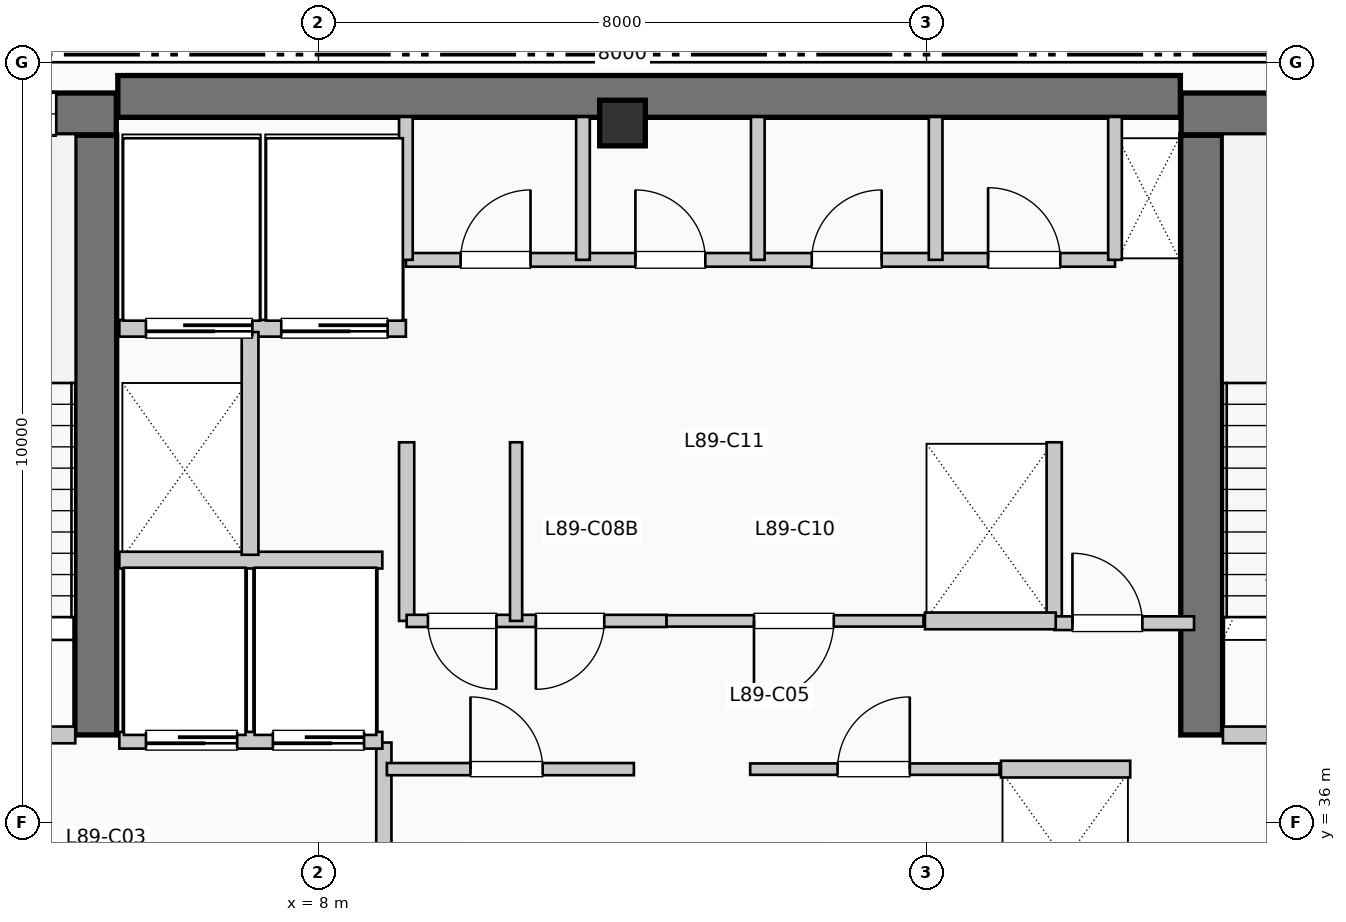
"""IFC4 building model, lengths in metres.
Left out: names, types, materials, properties, quantities, classifications, styles, units other than length and angle.
Written with IfcOpenShell. Run it as: python <this file> out.ifc"""

import sys

from ifc_helpers import new_model, si_unit, direction, frame, frame_2d, origin, origin_2d, place, context, subcontext, project, spatial, rectangle, extrude, element, fill, save


model = new_model("IFC4")
c1 = context("Model", 3, precision=1e-05, world=origin(), true_north=direction((0.0, 1.0)))
c2 = subcontext(c1, "Body", "Model", "MODEL_VIEW")
j1 = project(units=[si_unit("LENGTHUNIT", "METRE"), si_unit("PLANEANGLEUNIT", "RADIAN")], contexts=[c1])
p1 = place(None, origin())
s1 = spatial("IfcSite", under=j1, at=p1, CompositionType="ELEMENT")
p2 = place(p1, origin())
s2 = spatial("IfcBuilding", under=s1, at=p2, CompositionType="ELEMENT")
p3 = place(p2, frame((0.0, 0.0, 365.97)))
s3 = spatial("IfcBuildingStorey", under=s2, at=p3, CompositionType="ELEMENT", Elevation=365.97)
p4 = place(p3, frame((5.36, 45.55, 0.0), z_axis=(0.0, 0.0, 1.0), x_axis=(1.0, 0.0, 0.0)))
e1 = element("IfcWall", 1, at=p4, inside=s3, PredefinedType="SHEAR", context=c2, shape_type="SweptSolid", body=[
    extrude(rectangle(XDim=13.98, YDim=0.55, at=frame_2d((6.99, 0.0))), origin(), (0.0, 0.0, 1.0), 3.96),
])
p5 = place(p3, frame((5.07, 37.15, 0.0), z_axis=(0.0, 0.0, 1.0), x_axis=(0.0, 1.0, 0.0)))
e2 = element("IfcWall", 2, at=p5, inside=s3, PredefinedType="SHEAR", context=c2, shape_type="SweptSolid", body=[
    extrude(rectangle(XDim=7.89, YDim=0.55, at=frame_2d((3.945, 0.0))), origin(), (0.0, 0.0, 1.0), 3.96),
])
p6 = place(p3, frame((1.1, 45.32, 0.0), z_axis=(0.0, 0.0, 1.0), x_axis=(1.0, 0.0, 0.0)))
e3 = element("IfcWall", 3, at=p6, inside=s3, PredefinedType="SHEAR", context=c2, shape_type="SweptSolid", body=[
    extrude(rectangle(XDim=4.24, YDim=0.55, at=frame_2d((2.12, 0.0))), origin(), (0.0, 0.0, 1.0), 3.96),
])
p7 = place(p6, frame((2.05, 0.0, 1.05)))
e4 = element("IfcOpeningElement", 4, at=p7, cuts=e3, PredefinedType="OPENING", context=c2, shape_type="SweptSolid", body=[
    extrude(rectangle(XDim=1.4, YDim=1.8, at=frame_2d((0.7, 0.9))), frame((0.0, 0.285, 0.0), z_axis=(0.0, -1.0, 0.0), x_axis=(1.0, 0.0, 0.0)), (0.0, 0.0, 1.0), 0.57),
])
p8 = place(p3, frame((19.62, 37.15, 0.0), z_axis=(0.0, 0.0, 1.0), x_axis=(0.0, 1.0, 0.0)))
e5 = element("IfcWall", 5, at=p8, inside=s3, PredefinedType="SHEAR", context=c2, shape_type="SweptSolid", body=[
    extrude(rectangle(XDim=7.89, YDim=0.55, at=frame_2d((3.945, 0.0))), origin(), (0.0, 0.0, 1.0), 3.96),
])
p9 = place(p3, frame((19.35, 45.32, 0.0), z_axis=(0.0, 0.0, 1.0), x_axis=(1.0, 0.0, 0.0)))
e6 = element("IfcWall", 6, at=p9, inside=s3, PredefinedType="SHEAR", context=c2, shape_type="SweptSolid", body=[
    extrude(rectangle(XDim=3.69, YDim=0.55, at=frame_2d((1.845, 0.0))), origin(), (0.0, 0.0, 1.0), 3.96),
])
p10 = place(p9, frame((1.15, 0.0, 1.05)))
e7 = element("IfcOpeningElement", 7, at=p10, cuts=e6, PredefinedType="OPENING", context=c2, shape_type="SweptSolid", body=[
    extrude(rectangle(XDim=1.4, YDim=1.8, at=frame_2d((0.7, 0.9))), frame((0.0, 0.285, 0.0), z_axis=(0.0, -1.0, 0.0), x_axis=(1.0, 0.0, 0.0)), (0.0, 0.0, 1.0), 0.57),
])
p11 = place(p3, frame((12.0, 45.2, 0.0), z_axis=(0.0, 0.0, 1.0), x_axis=(1.0, 0.0, 0.0)))
e8 = element("IfcColumn", 8, at=p11, inside=s3, PredefinedType="COLUMN", context=c2, shape_type="SweptSolid", body=[
    extrude(rectangle(XDim=0.6, YDim=0.6, at=origin_2d()), origin(), (0.0, 0.0, 1.0), 3.96),
])
p12 = place(p3, frame((1.65, 37.15, 0.0), z_axis=(0.0, 0.0, 1.0), x_axis=(1.0, 0.0, 0.0)))
e9 = element("IfcWall", 9, at=p12, inside=s3, PredefinedType="PARTITIONING", context=c2, shape_type="SweptSolid", body=[
    extrude(rectangle(XDim=3.15, YDim=0.22, at=frame_2d((1.575, 0.0))), origin(), (0.0, 0.0, 1.0), 3.61),
])
p13 = place(p12, frame((2.05, 0.0, 0.0), z_axis=(0.0, 0.0, 1.0), x_axis=(-1.0, 0.0, 0.0)))
e10 = element("IfcOpeningElement", 10, at=p13, cuts=e9, PredefinedType="OPENING", context=c2, shape_type="SweptSolid", body=[
    extrude(rectangle(XDim=1.05, YDim=2.15, at=frame_2d((0.525, 1.075))), frame((0.0, 0.12, 0.0), z_axis=(0.0, -1.0, 0.0), x_axis=(1.0, 0.0, 0.0)), (0.0, 0.0, 1.0), 0.24),
])
p14 = place(p3, frame((8.86, 34.55, 0.0), z_axis=(0.0, 0.0, 1.0), x_axis=(0.0, 1.0, 0.0)))
e11 = element("IfcWall", 11, at=p14, inside=s3, PredefinedType="PARTITIONING", context=c2, shape_type="SweptSolid", body=[
    extrude(rectangle(XDim=2.5, YDim=0.2, at=frame_2d((1.25, 0.0))), origin(), (0.0, 0.0, 1.0), 3.61),
])
p15 = place(p3, frame((19.9, 37.15, 0.0), z_axis=(0.0, 0.0, 1.0), x_axis=(1.0, 0.0, 0.0)))
e12 = element("IfcWall", 12, at=p15, inside=s3, PredefinedType="PARTITIONING", context=c2, shape_type="SweptSolid", body=[
    extrude(rectangle(XDim=3.15, YDim=0.22, at=frame_2d((1.575, 0.0))), origin(), (0.0, 0.0, 1.0), 3.61),
])
p16 = place(p15, frame((2.05, 0.0, 0.0), z_axis=(0.0, 0.0, 1.0), x_axis=(-1.0, 0.0, 0.0)))
e13 = element("IfcOpeningElement", 13, at=p16, cuts=e12, PredefinedType="OPENING", context=c2, shape_type="SweptSolid", body=[
    extrude(rectangle(XDim=1.05, YDim=2.15, at=frame_2d((0.525, 1.075))), frame((0.0, 0.12, 0.0), z_axis=(0.0, -1.0, 0.0), x_axis=(1.0, 0.0, 0.0)), (0.0, 0.0, 1.0), 0.24),
])
p17 = place(p3, frame((5.38, 37.08, 0.0), z_axis=(0.0, 0.0, 1.0), x_axis=(1.0, 0.0, 0.0)))
e14 = element("IfcWall", 14, at=p17, inside=s3, PredefinedType="PARTITIONING", context=c2, shape_type="SweptSolid", body=[
    extrude(rectangle(XDim=3.46, YDim=0.22, at=frame_2d((1.73, 0.0))), origin(), (0.0, 0.0, 1.0), 3.61),
])
p18 = place(p17, frame((1.55, 0.0, 0.0), z_axis=(0.0, 0.0, 1.0), x_axis=(-1.0, 0.0, 0.0)))
e15 = element("IfcOpeningElement", 15, at=p18, cuts=e14, PredefinedType="OPENING", context=c2, shape_type="SweptSolid", body=[
    extrude(rectangle(XDim=1.2, YDim=2.2, at=frame_2d((0.6, 1.1))), frame((0.0, 0.12, 0.0), z_axis=(0.0, -1.0, 0.0), x_axis=(1.0, 0.0, 0.0)), (0.0, 0.0, 1.0), 0.24),
])
p19 = place(p17, frame((3.22, 0.0, 0.0), z_axis=(0.0, 0.0, 1.0), x_axis=(-1.0, 0.0, 0.0)))
e16 = element("IfcOpeningElement", 16, at=p19, cuts=e14, PredefinedType="OPENING", context=c2, shape_type="SweptSolid", body=[
    extrude(rectangle(XDim=1.2, YDim=2.2, at=frame_2d((0.6, 1.1))), frame((0.0, 0.12, 0.0), z_axis=(0.0, -1.0, 0.0), x_axis=(1.0, 0.0, 0.0)), (0.0, 0.0, 1.0), 0.24),
])
p20 = place(p3, frame((5.38, 39.45, 0.0), z_axis=(0.0, 0.0, 1.0), x_axis=(1.0, 0.0, 0.0)))
e17 = element("IfcWall", 17, at=p20, inside=s3, PredefinedType="PARTITIONING", context=c2, shape_type="SweptSolid", body=[
    extrude(rectangle(XDim=3.46, YDim=0.22, at=frame_2d((1.73, 0.0))), origin(), (0.0, 0.0, 1.0), 3.61),
])
p21 = place(p3, frame((5.38, 42.5, 0.0), z_axis=(0.0, 0.0, 1.0), x_axis=(1.0, 0.0, 0.0)))
e18 = element("IfcWall", 18, at=p21, inside=s3, PredefinedType="PARTITIONING", context=c2, shape_type="SweptSolid", body=[
    extrude(rectangle(XDim=3.77, YDim=0.22, at=frame_2d((1.885, 0.0))), origin(), (0.0, 0.0, 1.0), 3.61),
])
p22 = place(p21, frame((1.75, 0.0, 0.0), z_axis=(0.0, 0.0, 1.0), x_axis=(-1.0, 0.0, 0.0)))
e19 = element("IfcOpeningElement", 19, at=p22, cuts=e18, PredefinedType="OPENING", context=c2, shape_type="SweptSolid", body=[
    extrude(rectangle(XDim=1.4, YDim=2.2, at=frame_2d((0.7, 1.1))), frame((0.0, 0.12, 0.0), z_axis=(0.0, -1.0, 0.0), x_axis=(1.0, 0.0, 0.0)), (0.0, 0.0, 1.0), 0.24),
])
p23 = place(p21, frame((3.53, 0.0, 0.0), z_axis=(0.0, 0.0, 1.0), x_axis=(-1.0, 0.0, 0.0)))
e20 = element("IfcOpeningElement", 20, at=p23, cuts=e18, PredefinedType="OPENING", context=c2, shape_type="SweptSolid", body=[
    extrude(rectangle(XDim=1.4, YDim=2.2, at=frame_2d((0.7, 1.1))), frame((0.0, 0.12, 0.0), z_axis=(0.0, -1.0, 0.0), x_axis=(1.0, 0.0, 0.0)), (0.0, 0.0, 1.0), 0.24),
])
p24 = place(p3, frame((7.1, 39.52, 0.0), z_axis=(0.0, 0.0, 1.0), x_axis=(0.0, 1.0, 0.0)))
e21 = element("IfcWall", 21, at=p24, inside=s3, PredefinedType="PARTITIONING", context=c2, shape_type="SweptSolid", body=[
    extrude(rectangle(XDim=2.93, YDim=0.22, at=frame_2d((1.465, 0.0))), origin(), (0.0, 0.0, 1.0), 3.61),
])
for number, where, z_axis, x_axis in (
    (22, (9.16, 38.65, 0.0), (0.0, 0.0, 1.0), (0.0, 1.0, 0.0)),
    (23, (17.68, 38.65, 0.0), (0.0, 0.0, 1.0), (0.0, 1.0, 0.0)),
):
    element("IfcWall", number, at=place(p3, frame(where, z_axis=z_axis, x_axis=x_axis)), inside=s3, PredefinedType="PARTITIONING", context=c2, shape_type="SweptSolid", body=[
        extrude(rectangle(XDim=2.35, YDim=0.2, at=frame_2d((1.175, 0.0))), origin(), (0.0, 0.0, 1.0), 3.61),
    ])
p25 = place(p3, frame((17.68, 38.62, 0.0), z_axis=(0.0, 0.0, 1.0), x_axis=(1.0, 0.0, 0.0)))
e24 = element("IfcWall", 24, at=p25, inside=s3, PredefinedType="PARTITIONING", context=c2, shape_type="SweptSolid", body=[
    extrude(rectangle(XDim=1.84, YDim=0.18, at=frame_2d((0.92, 0.0))), origin(), (0.0, 0.0, 1.0), 3.61),
])
p26 = place(p25, frame((0.24, 0.0, 0.0)))
e25 = element("IfcOpeningElement", 25, at=p26, cuts=e24, PredefinedType="OPENING", context=c2, shape_type="SweptSolid", body=[
    extrude(rectangle(XDim=0.92, YDim=2.1, at=frame_2d((0.46, 1.05))), frame((0.0, 0.1, 0.0), z_axis=(0.0, -1.0, 0.0), x_axis=(1.0, 0.0, 0.0)), (0.0, 0.0, 1.0), 0.2),
])
p27 = place(p3, frame((8.9, 36.7, 0.0), z_axis=(0.0, 0.0, 1.0), x_axis=(1.0, 0.0, 0.0)))
e26 = element("IfcWall", 26, at=p27, inside=s3, PredefinedType="PARTITIONING", context=c2, shape_type="SweptSolid", body=[
    extrude(rectangle(XDim=3.25, YDim=0.16, at=frame_2d((1.625, 0.0))), origin(), (0.0, 0.0, 1.0), 3.61),
])
p28 = place(p27, frame((1.1, 0.0, 0.0)))
e27 = element("IfcOpeningElement", 27, at=p28, cuts=e26, PredefinedType="OPENING", context=c2, shape_type="SweptSolid", body=[
    extrude(rectangle(XDim=0.95, YDim=2.15, at=frame_2d((0.475, 1.075))), frame((0.0, 0.09, 0.0), z_axis=(0.0, -1.0, 0.0), x_axis=(1.0, 0.0, 0.0)), (0.0, 0.0, 1.0), 0.18),
])
p29 = place(p3, frame((9.16, 38.65, 0.0), z_axis=(0.0, 0.0, 1.0), x_axis=(1.0, 0.0, 0.0)))
e28 = element("IfcWall", 28, at=p29, inside=s3, PredefinedType="PARTITIONING", context=c2, shape_type="SweptSolid", body=[
    extrude(rectangle(XDim=3.42, YDim=0.16, at=frame_2d((1.71, 0.0))), origin(), (0.0, 0.0, 1.0), 3.61),
])
p30 = place(p29, frame((1.18, 0.0, 0.0), z_axis=(0.0, 0.0, 1.0), x_axis=(-1.0, 0.0, 0.0)))
e29 = element("IfcOpeningElement", 29, at=p30, cuts=e28, PredefinedType="OPENING", context=c2, shape_type="SweptSolid", body=[
    extrude(rectangle(XDim=0.9, YDim=2.15, at=frame_2d((0.45, 1.075))), frame((0.0, 0.09, 0.0), z_axis=(0.0, -1.0, 0.0), x_axis=(1.0, 0.0, 0.0)), (0.0, 0.0, 1.0), 0.18),
])
p31 = place(p29, frame((2.6, 0.0, 0.0), z_axis=(0.0, 0.0, 1.0), x_axis=(-1.0, 0.0, 0.0)))
e30 = element("IfcOpeningElement", 30, at=p31, cuts=e28, PredefinedType="OPENING", context=c2, shape_type="SweptSolid", body=[
    extrude(rectangle(XDim=0.9, YDim=2.15, at=frame_2d((0.45, 1.075))), frame((0.0, 0.09, 0.0), z_axis=(0.0, -1.0, 0.0), x_axis=(1.0, 0.0, 0.0)), (0.0, 0.0, 1.0), 0.18),
])
p32 = place(p3, frame((10.6, 38.65, 0.0), z_axis=(0.0, 0.0, 1.0), x_axis=(0.0, 1.0, 0.0)))
e31 = element("IfcWall", 31, at=p32, inside=s3, PredefinedType="PARTITIONING", context=c2, shape_type="SweptSolid", body=[
    extrude(rectangle(XDim=2.35, YDim=0.16, at=frame_2d((1.175, 0.0))), origin(), (0.0, 0.0, 1.0), 3.61),
])
p33 = place(p3, frame((13.68, 36.7, 0.0), z_axis=(0.0, 0.0, 1.0), x_axis=(1.0, 0.0, 0.0)))
e32 = element("IfcWall", 32, at=p33, inside=s3, PredefinedType="PARTITIONING", context=c2, shape_type="SweptSolid", body=[
    extrude(rectangle(XDim=3.28, YDim=0.15, at=frame_2d((1.64, 0.0))), origin(), (0.0, 0.0, 1.0), 3.61),
])
p34 = place(p33, frame((1.15, 0.0, 0.0)))
e33 = element("IfcOpeningElement", 33, at=p34, cuts=e32, PredefinedType="OPENING", context=c2, shape_type="SweptSolid", body=[
    extrude(rectangle(XDim=0.95, YDim=2.15, at=frame_2d((0.475, 1.075))), frame((0.0, 0.085, 0.0), z_axis=(0.0, -1.0, 0.0), x_axis=(1.0, 0.0, 0.0)), (0.0, 0.0, 1.0), 0.17),
])
p35 = place(p3, frame((12.58, 38.65, 0.0), z_axis=(0.0, 0.0, 1.0), x_axis=(1.0, 0.0, 0.0)))
e34 = element("IfcWall", 34, at=p35, inside=s3, PredefinedType="PARTITIONING", context=c2, shape_type="SweptSolid", body=[
    extrude(rectangle(XDim=3.38, YDim=0.15, at=frame_2d((1.69, 0.0))), origin(), (0.0, 0.0, 1.0), 3.61),
])
p36 = place(p35, frame((2.2, 0.0, 0.0), z_axis=(0.0, 0.0, 1.0), x_axis=(-1.0, 0.0, 0.0)))
e35 = element("IfcOpeningElement", 35, at=p36, cuts=e34, PredefinedType="OPENING", context=c2, shape_type="SweptSolid", body=[
    extrude(rectangle(XDim=1.05, YDim=2.15, at=frame_2d((0.525, 1.075))), frame((0.0, 0.085, 0.0), z_axis=(0.0, -1.0, 0.0), x_axis=(1.0, 0.0, 0.0)), (0.0, 0.0, 1.0), 0.17),
])
p37 = place(p3, frame((16.98, 36.7, 0.0), z_axis=(0.0, 0.0, 1.0), x_axis=(1.0, 0.0, 0.0)))
e36 = element("IfcWall", 36, at=p37, inside=s3, PredefinedType="PARTITIONING", context=c2, shape_type="SweptSolid", body=[
    extrude(rectangle(XDim=1.7, YDim=0.22, at=frame_2d((0.85, 0.0))), origin(), (0.0, 0.0, 1.0), 3.61),
])
p38 = place(p3, frame((15.98, 38.65, 0.0), z_axis=(0.0, 0.0, 1.0), x_axis=(1.0, 0.0, 0.0)))
e37 = element("IfcWall", 37, at=p38, inside=s3, PredefinedType="PARTITIONING", context=c2, shape_type="SweptSolid", body=[
    extrude(rectangle(XDim=1.72, YDim=0.22, at=frame_2d((0.86, 0.0))), origin(), (0.0, 0.0, 1.0), 3.61),
])
p39 = place(p3, frame((9.15, 43.4, 0.0), z_axis=(0.0, 0.0, 1.0), x_axis=(1.0, 0.0, 0.0)))
e38 = element("IfcWall", 38, at=p39, inside=s3, PredefinedType="PLUMBINGWALL", context=c2, shape_type="SweptSolid", body=[
    extrude(rectangle(XDim=9.33, YDim=0.18, at=frame_2d((4.665, 0.0))), origin(), (0.0, 0.0, 1.0), 3.61),
])
p40 = place(p39, frame((0.72, 0.0, 0.0)))
e39 = element("IfcOpeningElement", 39, at=p40, cuts=e38, PredefinedType="OPENING", context=c2, shape_type="SweptSolid", body=[
    extrude(rectangle(XDim=0.92, YDim=2.1, at=frame_2d((0.46, 1.05))), frame((0.0, 0.1, 0.0), z_axis=(0.0, -1.0, 0.0), x_axis=(1.0, 0.0, 0.0)), (0.0, 0.0, 1.0), 0.2),
])
p41 = place(p39, frame((3.02, 0.0, 0.0)))
e40 = element("IfcOpeningElement", 40, at=p41, cuts=e38, PredefinedType="OPENING", context=c2, shape_type="SweptSolid", body=[
    extrude(rectangle(XDim=0.92, YDim=2.1, at=frame_2d((0.46, 1.05))), frame((0.0, 0.1, 0.0), z_axis=(0.0, -1.0, 0.0), x_axis=(1.0, 0.0, 0.0)), (0.0, 0.0, 1.0), 0.2),
])
p42 = place(p39, frame((5.34, 0.0, 0.0)))
e41 = element("IfcOpeningElement", 41, at=p42, cuts=e38, PredefinedType="OPENING", context=c2, shape_type="SweptSolid", body=[
    extrude(rectangle(XDim=0.92, YDim=2.1, at=frame_2d((0.46, 1.05))), frame((0.0, 0.1, 0.0), z_axis=(0.0, -1.0, 0.0), x_axis=(1.0, 0.0, 0.0)), (0.0, 0.0, 1.0), 0.2),
])
p43 = place(p39, frame((7.66, 0.0, 0.0)))
e42 = element("IfcOpeningElement", 42, at=p43, cuts=e38, PredefinedType="OPENING", context=c2, shape_type="SweptSolid", body=[
    extrude(rectangle(XDim=0.95, YDim=2.1, at=frame_2d((0.475, 1.05))), frame((0.0, 0.1, 0.0), z_axis=(0.0, -1.0, 0.0), x_axis=(1.0, 0.0, 0.0)), (0.0, 0.0, 1.0), 0.2),
])
for number, where, z_axis, x_axis in (
    (43, (9.15, 43.4, 0.0), (0.0, 0.0, 1.0), (0.0, 1.0, 0.0)),
    (44, (18.48, 43.4, 0.0), (0.0, 0.0, 1.0), (0.0, 1.0, 0.0)),
    (45, (11.48, 43.4, 0.0), (0.0, 0.0, 1.0), (0.0, 1.0, 0.0)),
    (46, (13.78, 43.4, 0.0), (0.0, 0.0, 1.0), (0.0, 1.0, 0.0)),
    (47, (16.12, 43.4, 0.0), (0.0, 0.0, 1.0), (0.0, 1.0, 0.0)),
):
    element("IfcWall", number, at=place(p3, frame(where, z_axis=z_axis, x_axis=x_axis)), inside=s3, PredefinedType="PLUMBINGWALL", context=c2, shape_type="SweptSolid", body=[
        extrude(rectangle(XDim=1.88, YDim=0.18, at=frame_2d((0.94, 0.0))), origin(), (0.0, 0.0, 1.0), 3.61),
    ])
p44 = place(p7, origin())
e48 = element("IfcWindow", 48, at=p44, inside=s3, PartitioningType="SINGLE_PANEL", PredefinedType="WINDOW", context=c2, shape_type="SweptSolid", body=[
    extrude(rectangle(XDim=1.4, YDim=1.8, at=frame_2d((0.7, 0.9))), frame((0.0, 0.03, 0.0), z_axis=(0.0, -1.0, 0.0), x_axis=(1.0, 0.0, 0.0)), (0.0, 0.0, 1.0), 0.06),
])
fill(e4, e48)
p45 = place(p18, origin())
e49 = element("IfcDoor", 49, at=p45, inside=s3, OperationType="SLIDING_TO_RIGHT", PredefinedType="DOOR", context=c2, shape_type="SweptSolid", body=[
    extrude(rectangle(XDim=1.2, YDim=2.2, at=frame_2d((0.6, 1.1))), frame((0.0, 0.025, 0.0), z_axis=(0.0, -1.0, 0.0), x_axis=(1.0, 0.0, 0.0)), (0.0, 0.0, 1.0), 0.05),
])
fill(e15, e49)
p46 = place(p19, origin())
e50 = element("IfcDoor", 50, at=p46, inside=s3, OperationType="SLIDING_TO_RIGHT", PredefinedType="DOOR", context=c2, shape_type="SweptSolid", body=[
    extrude(rectangle(XDim=1.2, YDim=2.2, at=frame_2d((0.6, 1.1))), frame((0.0, 0.025, 0.0), z_axis=(0.0, -1.0, 0.0), x_axis=(1.0, 0.0, 0.0)), (0.0, 0.0, 1.0), 0.05),
])
fill(e16, e50)
p47 = place(p22, origin())
e51 = element("IfcDoor", 51, at=p47, inside=s3, OperationType="SLIDING_TO_LEFT", PredefinedType="DOOR", context=c2, shape_type="SweptSolid", body=[
    extrude(rectangle(XDim=1.4, YDim=2.2, at=frame_2d((0.7, 1.1))), frame((0.0, 0.025, 0.0), z_axis=(0.0, -1.0, 0.0), x_axis=(1.0, 0.0, 0.0)), (0.0, 0.0, 1.0), 0.05),
])
fill(e19, e51)
p48 = place(p23, origin())
e52 = element("IfcDoor", 52, at=p48, inside=s3, OperationType="SLIDING_TO_LEFT", PredefinedType="DOOR", context=c2, shape_type="SweptSolid", body=[
    extrude(rectangle(XDim=1.4, YDim=2.2, at=frame_2d((0.7, 1.1))), frame((0.0, 0.025, 0.0), z_axis=(0.0, -1.0, 0.0), x_axis=(1.0, 0.0, 0.0)), (0.0, 0.0, 1.0), 0.05),
])
fill(e20, e52)
p49 = place(p26, origin())
e53 = element("IfcDoor", 53, at=p49, inside=s3, OperationType="SINGLE_SWING_LEFT", PredefinedType="DOOR", context=c2, shape_type="SweptSolid", body=[
    extrude(rectangle(XDim=0.92, YDim=2.1, at=frame_2d((0.46, 1.05))), frame((0.0, 0.025, 0.0), z_axis=(0.0, -1.0, 0.0), x_axis=(1.0, 0.0, 0.0)), (0.0, 0.0, 1.0), 0.05),
])
fill(e25, e53)
p50 = place(p28, origin())
e54 = element("IfcDoor", 54, at=p50, inside=s3, OperationType="SINGLE_SWING_LEFT", PredefinedType="DOOR", context=c2, shape_type="SweptSolid", body=[
    extrude(rectangle(XDim=0.95, YDim=2.15, at=frame_2d((0.475, 1.075))), frame((0.0, 0.025, 0.0), z_axis=(0.0, -1.0, 0.0), x_axis=(1.0, 0.0, 0.0)), (0.0, 0.0, 1.0), 0.05),
])
fill(e27, e54)
p51 = place(p30, origin())
e55 = element("IfcDoor", 55, at=p51, inside=s3, OperationType="SINGLE_SWING_RIGHT", PredefinedType="DOOR", context=c2, shape_type="SweptSolid", body=[
    extrude(rectangle(XDim=0.9, YDim=2.15, at=frame_2d((0.45, 1.075))), frame((0.0, 0.025, 0.0), z_axis=(0.0, -1.0, 0.0), x_axis=(1.0, 0.0, 0.0)), (0.0, 0.0, 1.0), 0.05),
])
fill(e29, e55)
p52 = place(p31, origin())
e56 = element("IfcDoor", 56, at=p52, inside=s3, OperationType="SINGLE_SWING_LEFT", PredefinedType="DOOR", context=c2, shape_type="SweptSolid", body=[
    extrude(rectangle(XDim=0.9, YDim=2.15, at=frame_2d((0.45, 1.075))), frame((0.0, 0.025, 0.0), z_axis=(0.0, -1.0, 0.0), x_axis=(1.0, 0.0, 0.0)), (0.0, 0.0, 1.0), 0.05),
])
fill(e30, e56)
p53 = place(p34, origin())
e57 = element("IfcDoor", 57, at=p53, inside=s3, OperationType="SINGLE_SWING_RIGHT", PredefinedType="DOOR", context=c2, shape_type="SweptSolid", body=[
    extrude(rectangle(XDim=0.95, YDim=2.15, at=frame_2d((0.475, 1.075))), frame((0.0, 0.025, 0.0), z_axis=(0.0, -1.0, 0.0), x_axis=(1.0, 0.0, 0.0)), (0.0, 0.0, 1.0), 0.05),
])
fill(e33, e57)
p54 = place(p36, origin())
e58 = element("IfcDoor", 58, at=p54, inside=s3, OperationType="SINGLE_SWING_LEFT", PredefinedType="DOOR", context=c2, shape_type="SweptSolid", body=[
    extrude(rectangle(XDim=1.05, YDim=2.15, at=frame_2d((0.525, 1.075))), frame((0.0, 0.025, 0.0), z_axis=(0.0, -1.0, 0.0), x_axis=(1.0, 0.0, 0.0)), (0.0, 0.0, 1.0), 0.05),
])
fill(e35, e58)
p55 = place(p40, origin())
e59 = element("IfcDoor", 59, at=p55, inside=s3, OperationType="SINGLE_SWING_RIGHT", PredefinedType="DOOR", context=c2, shape_type="SweptSolid", body=[
    extrude(rectangle(XDim=0.92, YDim=2.1, at=frame_2d((0.46, 1.05))), frame((0.0, 0.025, 0.0), z_axis=(0.0, -1.0, 0.0), x_axis=(1.0, 0.0, 0.0)), (0.0, 0.0, 1.0), 0.05),
])
fill(e39, e59)
p56 = place(p41, origin())
e60 = element("IfcDoor", 60, at=p56, inside=s3, OperationType="SINGLE_SWING_LEFT", PredefinedType="DOOR", context=c2, shape_type="SweptSolid", body=[
    extrude(rectangle(XDim=0.92, YDim=2.1, at=frame_2d((0.46, 1.05))), frame((0.0, 0.025, 0.0), z_axis=(0.0, -1.0, 0.0), x_axis=(1.0, 0.0, 0.0)), (0.0, 0.0, 1.0), 0.05),
])
fill(e40, e60)
p57 = place(p42, origin())
e61 = element("IfcDoor", 61, at=p57, inside=s3, OperationType="SINGLE_SWING_RIGHT", PredefinedType="DOOR", context=c2, shape_type="SweptSolid", body=[
    extrude(rectangle(XDim=0.92, YDim=2.1, at=frame_2d((0.46, 1.05))), frame((0.0, 0.025, 0.0), z_axis=(0.0, -1.0, 0.0), x_axis=(1.0, 0.0, 0.0)), (0.0, 0.0, 1.0), 0.05),
])
fill(e41, e61)
p58 = place(p43, origin())
e62 = element("IfcDoor", 62, at=p58, inside=s3, OperationType="SINGLE_SWING_LEFT", PredefinedType="DOOR", context=c2, shape_type="SweptSolid", body=[
    extrude(rectangle(XDim=0.95, YDim=2.1, at=frame_2d((0.475, 1.05))), frame((0.0, 0.025, 0.0), z_axis=(0.0, -1.0, 0.0), x_axis=(1.0, 0.0, 0.0)), (0.0, 0.0, 1.0), 0.05),
])
fill(e42, e62)
save(model, sys.argv[1])
